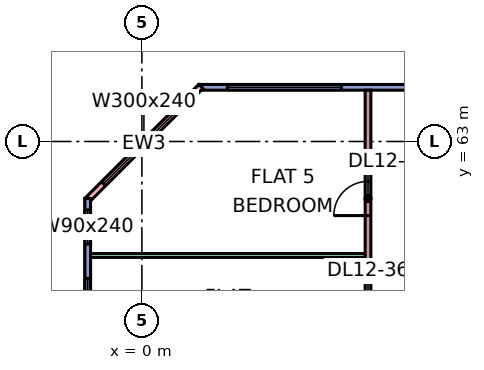
"""IFC4 building model, lengths in metres.
Left out: names, types, materials, properties, quantities, classifications, styles, units other than length and angle.
Written with IfcOpenShell. Run it as: python <this file> out.ifc"""

import sys

from ifc_helpers import new_model, si_unit, direction, frame, frame_2d, origin, place, context, subcontext, project, spatial, rectangle, extrude, element, fill, save


model = new_model("IFC4")
c1 = context("Model", 3, precision=1e-05, world=origin(), true_north=direction((0.0, 1.0)))
c2 = subcontext(c1, "Body", "Model", "MODEL_VIEW")
j1 = project(units=[si_unit("LENGTHUNIT", "METRE"), si_unit("PLANEANGLEUNIT", "RADIAN")], contexts=[c1])
p1 = place(None, origin())
s1 = spatial("IfcSite", under=j1, at=p1, CompositionType="ELEMENT")
p2 = place(p1, origin())
s2 = spatial("IfcBuilding", under=s1, at=p2, CompositionType="ELEMENT")
p3 = place(p2, frame((0.0, 0.0, 60.15)))
s3 = spatial("IfcBuildingStorey", under=s2, at=p3, CompositionType="ELEMENT", Elevation=60.15)
p4 = place(p3, frame((11.925, 64.425, 0.0), z_axis=(0.0, 0.0, 1.0), x_axis=(-1.0, 0.0, 0.0)))
e1 = element("IfcWall", 1, at=p4, inside=s3, PredefinedType="SOLIDWALL", context=c2, shape_type="SweptSolid", body=[
    extrude(rectangle(XDim=10.425, YDim=0.15, at=frame_2d((5.212, 0.0))), origin(), (0.0, 0.0, 1.0), 3.35),
])
p5 = place(p4, frame((6.675, 0.0, 0.45)))
e2 = element("IfcOpeningElement", 2, at=p5, cuts=e1, PredefinedType="OPENING", context=c2, shape_type="SweptSolid", body=[
    extrude(rectangle(XDim=3.0, YDim=2.4, at=frame_2d((1.5, 1.2))), frame((0.0, 0.085, 0.0), z_axis=(0.0, -1.0, 0.0), x_axis=(1.0, 0.0, 0.0)), (0.0, 0.0, 1.0), 0.17),
])
p6 = place(p3, frame((1.553, 64.447, 0.0), z_axis=(0.0, 0.0, 1.0), x_axis=(-0.707106781187, -0.707106781187, 0.0)))
e3 = element("IfcWall", 3, at=p6, inside=s3, PredefinedType="SOLIDWALL", context=c2, shape_type="SweptSolid", body=[
    extrude(rectangle(XDim=4.243, YDim=0.15, at=frame_2d((2.121, 0.0))), origin(), (0.0, 0.0, 1.0), 3.35),
])
p7 = place(p6, frame((0.621, 0.0, 0.45)))
e4 = element("IfcOpeningElement", 4, at=p7, cuts=e3, PredefinedType="OPENING", context=c2, shape_type="SweptSolid", body=[
    extrude(rectangle(XDim=3.0, YDim=2.4, at=frame_2d((1.5, 1.2))), frame((0.0, 0.085, 0.0), z_axis=(0.0, -1.0, 0.0), x_axis=(1.0, 0.0, 0.0)), (0.0, 0.0, 1.0), 0.17),
])
p8 = place(p3, frame((-1.425, 61.5, 0.0), z_axis=(0.0, 0.0, 1.0), x_axis=(0.0, -1.0, 0.0)))
e5 = element("IfcWall", 5, at=p8, inside=s3, PredefinedType="SOLIDWALL", context=c2, shape_type="SweptSolid", body=[
    extrude(rectangle(XDim=13.425, YDim=0.15, at=frame_2d((6.712, 0.0))), origin(), (0.0, 0.0, 1.0), 3.35),
])
p9 = place(p8, frame((0.3, 0.0, 0.45)))
e6 = element("IfcOpeningElement", 6, at=p9, cuts=e5, PredefinedType="OPENING", context=c2, shape_type="SweptSolid", body=[
    extrude(rectangle(XDim=0.9, YDim=2.4, at=frame_2d((0.45, 1.2))), frame((0.0, 0.085, 0.0), z_axis=(0.0, -1.0, 0.0), x_axis=(1.0, 0.0, 0.0)), (0.0, 0.0, 1.0), 0.17),
])
p10 = place(p8, frame((2.1, 0.0, 0.45)))
e7 = element("IfcOpeningElement", 7, at=p10, cuts=e5, PredefinedType="OPENING", context=c2, shape_type="SweptSolid", body=[
    extrude(rectangle(XDim=1.8, YDim=2.4, at=frame_2d((0.9, 1.2))), frame((0.0, 0.085, 0.0), z_axis=(0.0, -1.0, 0.0), x_axis=(1.0, 0.0, 0.0)), (0.0, 0.0, 1.0), 0.17),
])
p11 = place(p8, frame((5.1, 0.0, 0.45)))
e8 = element("IfcOpeningElement", 8, at=p11, cuts=e5, PredefinedType="OPENING", context=c2, shape_type="SweptSolid", body=[
    extrude(rectangle(XDim=1.8, YDim=2.4, at=frame_2d((0.9, 1.2))), frame((0.0, 0.085, 0.0), z_axis=(0.0, -1.0, 0.0), x_axis=(1.0, 0.0, 0.0)), (0.0, 0.0, 1.0), 0.17),
])
p12 = place(p8, frame((8.1, 0.0, 0.45)))
e9 = element("IfcOpeningElement", 9, at=p12, cuts=e5, PredefinedType="OPENING", context=c2, shape_type="SweptSolid", body=[
    extrude(rectangle(XDim=1.8, YDim=2.4, at=frame_2d((0.9, 1.2))), frame((0.0, 0.085, 0.0), z_axis=(0.0, -1.0, 0.0), x_axis=(1.0, 0.0, 0.0)), (0.0, 0.0, 1.0), 0.17),
])
p13 = place(p8, frame((11.062, 0.0, 0.45)))
e10 = element("IfcOpeningElement", 10, at=p13, cuts=e5, PredefinedType="OPENING", context=c2, shape_type="SweptSolid", body=[
    extrude(rectangle(XDim=1.8, YDim=2.4, at=frame_2d((0.9, 1.2))), frame((0.0, 0.085, 0.0), z_axis=(0.0, -1.0, 0.0), x_axis=(1.0, 0.0, 0.0)), (0.0, 0.0, 1.0), 0.17),
])
p14 = place(p3, frame((-1.351, 60.0, 0.0), z_axis=(0.0, 0.0, 1.0), x_axis=(1.0, 0.0, 0.0)))
e11 = element("IfcWall", 11, at=p14, inside=s3, PredefinedType="PARTITIONING", context=c2, shape_type="SweptSolid", body=[
    extrude(rectangle(XDim=7.226, YDim=0.1, at=frame_2d((3.613, 0.0))), origin(), (0.0, 0.0, 1.0), 3.35),
])
p15 = place(p3, frame((5.95, 36.1, 0.0), z_axis=(0.0, 0.0, 1.0), x_axis=(0.0, 1.0, 0.0)))
e12 = element("IfcWall", 12, at=p15, inside=s3, PredefinedType="PARTITIONING", context=c2, shape_type="SweptSolid", body=[
    extrude(rectangle(XDim=28.25, YDim=0.15, at=frame_2d((14.125, 0.0))), origin(), (0.0, 0.0, 1.0), 3.35),
])
p16 = place(p15, frame((3.95, 0.0, 0.0)))
e13 = element("IfcOpeningElement", 13, at=p16, cuts=e12, PredefinedType="OPENING", context=c2, shape_type="SweptSolid", body=[
    extrude(rectangle(XDim=0.9, YDim=2.1, at=frame_2d((0.45, 1.05))), frame((0.0, 0.085, 0.0), z_axis=(0.0, -1.0, 0.0), x_axis=(1.0, 0.0, 0.0)), (0.0, 0.0, 1.0), 0.17),
])
p17 = place(p15, frame((12.95, 0.0, 0.0)))
e14 = element("IfcOpeningElement", 14, at=p17, cuts=e12, PredefinedType="OPENING", context=c2, shape_type="SweptSolid", body=[
    extrude(rectangle(XDim=0.9, YDim=2.1, at=frame_2d((0.45, 1.05))), frame((0.0, 0.085, 0.0), z_axis=(0.0, -1.0, 0.0), x_axis=(1.0, 0.0, 0.0)), (0.0, 0.0, 1.0), 0.17),
])
p18 = place(p15, frame((18.95, 0.0, 0.0)))
e15 = element("IfcOpeningElement", 15, at=p18, cuts=e12, PredefinedType="OPENING", context=c2, shape_type="SweptSolid", body=[
    extrude(rectangle(XDim=0.9, YDim=2.1, at=frame_2d((0.45, 1.05))), frame((0.0, 0.085, 0.0), z_axis=(0.0, -1.0, 0.0), x_axis=(1.0, 0.0, 0.0)), (0.0, 0.0, 1.0), 0.17),
])
p19 = place(p15, frame((21.95, 0.0, 0.0)))
e16 = element("IfcOpeningElement", 16, at=p19, cuts=e12, PredefinedType="OPENING", context=c2, shape_type="SweptSolid", body=[
    extrude(rectangle(XDim=0.9, YDim=2.1, at=frame_2d((0.45, 1.05))), frame((0.0, 0.085, 0.0), z_axis=(0.0, -1.0, 0.0), x_axis=(1.0, 0.0, 0.0)), (0.0, 0.0, 1.0), 0.17),
])
p20 = place(p15, frame((24.95, 0.0, 0.0)))
e17 = element("IfcOpeningElement", 17, at=p20, cuts=e12, PredefinedType="OPENING", context=c2, shape_type="SweptSolid", body=[
    extrude(rectangle(XDim=0.9, YDim=2.1, at=frame_2d((0.45, 1.05))), frame((0.0, 0.085, 0.0), z_axis=(0.0, -1.0, 0.0), x_axis=(1.0, 0.0, 0.0)), (0.0, 0.0, 1.0), 0.17),
])
p21 = place(p15, frame((15.95, 0.0, 0.0)))
e18 = element("IfcOpeningElement", 18, at=p21, cuts=e12, PredefinedType="OPENING", context=c2, shape_type="SweptSolid", body=[
    extrude(rectangle(XDim=0.9, YDim=2.1, at=frame_2d((0.45, 1.05))), frame((0.0, 0.085, 0.0), z_axis=(0.0, -1.0, 0.0), x_axis=(1.0, 0.0, 0.0)), (0.0, 0.0, 1.0), 0.17),
])
p22 = place(p15, frame((10.8, 0.0, 0.0)))
e19 = element("IfcOpeningElement", 19, at=p22, cuts=e12, PredefinedType="OPENING", context=c2, shape_type="SweptSolid", body=[
    extrude(rectangle(XDim=0.8, YDim=2.1, at=frame_2d((0.4, 1.05))), frame((0.0, 0.085, 0.0), z_axis=(0.0, -1.0, 0.0), x_axis=(1.0, 0.0, 0.0)), (0.0, 0.0, 1.0), 0.17),
])
p23 = place(p15, frame((0.55, 0.0, 0.0)))
e20 = element("IfcOpeningElement", 20, at=p23, cuts=e12, PredefinedType="OPENING", context=c2, shape_type="SweptSolid", body=[
    extrude(rectangle(XDim=1.6, YDim=2.1, at=frame_2d((0.8, 1.05))), frame((0.0, 0.085, 0.0), z_axis=(0.0, -1.0, 0.0), x_axis=(1.0, 0.0, 0.0)), (0.0, 0.0, 1.0), 0.17),
])
p24 = place(p15, frame((6.95, 0.0, 0.0)))
e21 = element("IfcOpeningElement", 21, at=p24, cuts=e12, PredefinedType="OPENING", context=c2, shape_type="SweptSolid", body=[
    extrude(rectangle(XDim=0.9, YDim=2.1, at=frame_2d((0.45, 1.05))), frame((0.0, 0.085, 0.0), z_axis=(0.0, -1.0, 0.0), x_axis=(1.0, 0.0, 0.0)), (0.0, 0.0, 1.0), 0.17),
])
p25 = place(p5, origin())
e22 = element("IfcWindow", 22, at=p25, inside=s3, PartitioningType="SINGLE_PANEL", PredefinedType="WINDOW", context=c2, shape_type="SweptSolid", body=[
    extrude(rectangle(XDim=3.0, YDim=2.4, at=frame_2d((1.5, 1.2))), frame((0.0, 0.03, 0.0), z_axis=(0.0, -1.0, 0.0), x_axis=(1.0, 0.0, 0.0)), (0.0, 0.0, 1.0), 0.06),
])
fill(e2, e22)
p26 = place(p7, origin())
e23 = element("IfcWindow", 23, at=p26, inside=s3, PartitioningType="SINGLE_PANEL", PredefinedType="WINDOW", context=c2, shape_type="SweptSolid", body=[
    extrude(rectangle(XDim=3.0, YDim=2.4, at=frame_2d((1.5, 1.2))), frame((0.0, 0.03, 0.0), z_axis=(0.0, -1.0, 0.0), x_axis=(1.0, 0.0, 0.0)), (0.0, 0.0, 1.0), 0.06),
])
fill(e4, e23)
p27 = place(p9, origin())
e24 = element("IfcWindow", 24, at=p27, inside=s3, PartitioningType="SINGLE_PANEL", PredefinedType="WINDOW", context=c2, shape_type="SweptSolid", body=[
    extrude(rectangle(XDim=0.9, YDim=2.4, at=frame_2d((0.45, 1.2))), frame((0.0, 0.03, 0.0), z_axis=(0.0, -1.0, 0.0), x_axis=(1.0, 0.0, 0.0)), (0.0, 0.0, 1.0), 0.06),
])
fill(e6, e24)
p28 = place(p10, origin())
e25 = element("IfcWindow", 25, at=p28, inside=s3, PartitioningType="SINGLE_PANEL", PredefinedType="WINDOW", context=c2, shape_type="SweptSolid", body=[
    extrude(rectangle(XDim=1.8, YDim=2.4, at=frame_2d((0.9, 1.2))), frame((0.0, 0.03, 0.0), z_axis=(0.0, -1.0, 0.0), x_axis=(1.0, 0.0, 0.0)), (0.0, 0.0, 1.0), 0.06),
])
fill(e7, e25)
p29 = place(p20, origin())
e26 = element("IfcDoor", 26, at=p29, inside=s3, OperationType="SINGLE_SWING_LEFT", PredefinedType="DOOR", context=c2, shape_type="SweptSolid", body=[
    extrude(rectangle(XDim=0.9, YDim=2.1, at=frame_2d((0.45, 1.05))), frame((0.0, 0.025, 0.0), z_axis=(0.0, -1.0, 0.0), x_axis=(1.0, 0.0, 0.0)), (0.0, 0.0, 1.0), 0.05),
])
fill(e17, e26)
save(model, sys.argv[1])
